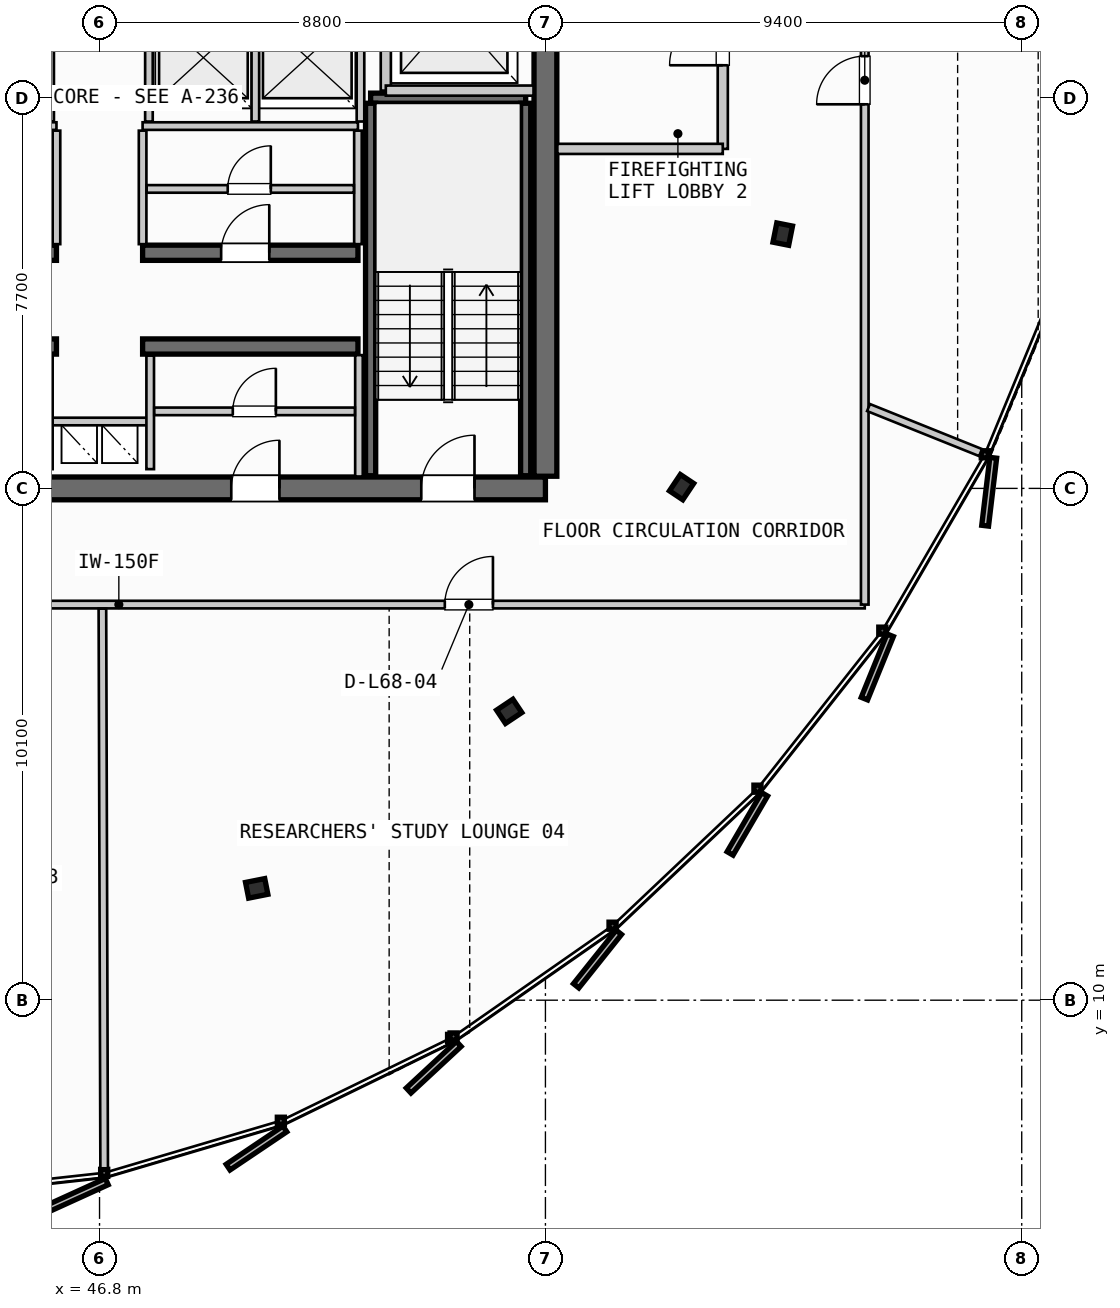
"""IFC4 building model, lengths in metres.
Left out: names, types, materials, properties, quantities, classifications, styles, units other than length and angle.
Written with IfcOpenShell. Run it as: python <this file> out.ifc"""

import sys

from ifc_helpers import new_model, si_unit, direction, frame, frame_2d, origin, origin_2d, place, context, subcontext, project, spatial, rectangle, i_section, extrude, source, transform, mapped, element, fill, save


model = new_model("IFC4")
c1 = context("Model", 3, precision=1e-05, world=origin(), true_north=direction((0.0, 1.0)))
c2 = subcontext(c1, "Body", "Model", "MODEL_VIEW")
j1 = project(units=[si_unit("LENGTHUNIT", "METRE"), si_unit("PLANEANGLEUNIT", "RADIAN")], contexts=[c1])
p1 = place(None, origin())
s1 = spatial("IfcSite", under=j1, at=p1, CompositionType="ELEMENT")
p2 = place(p1, origin())
s2 = spatial("IfcBuilding", under=s1, at=p2, CompositionType="ELEMENT")
p3 = place(p2, frame((0.0, 0.0, 259.45)))
s3 = spatial("IfcBuildingStorey", under=s2, at=p3, CompositionType="ELEMENT", Elevation=259.45)
p4 = place(p3, frame((38.0, 20.1, 0.0), z_axis=(0.0, 0.0, 1.0), x_axis=(1.0, 0.0, 0.0)))
e1 = element("IfcWall", 1, at=p4, inside=s3, PredefinedType="SHEAR", context=c2, shape_type="SweptSolid", body=[
    extrude(rectangle(XDim=17.6, YDim=0.45, at=frame_2d((8.8, 0.0))), origin(), (0.0, 0.0, 1.0), 3.21),
])
p5 = place(p4, frame((1.4, 0.0, 0.0)))
e2 = element("IfcOpeningElement", 2, at=p5, cuts=e1, PredefinedType="OPENING", context=c2, shape_type="SweptSolid", body=[
    extrude(rectangle(XDim=1.05, YDim=2.15, at=frame_2d((0.525, 1.075))), frame((0.0, 0.235, 0.0), z_axis=(0.0, -1.0, 0.0), x_axis=(1.0, 0.0, 0.0)), (0.0, 0.0, 1.0), 0.47),
])
p6 = place(p4, frame((15.15, 0.0, 0.0)))
e3 = element("IfcOpeningElement", 3, at=p6, cuts=e1, PredefinedType="OPENING", context=c2, shape_type="SweptSolid", body=[
    extrude(rectangle(XDim=1.05, YDim=2.15, at=frame_2d((0.525, 1.075))), frame((0.0, 0.235, 0.0), z_axis=(0.0, -1.0, 0.0), x_axis=(1.0, 0.0, 0.0)), (0.0, 0.0, 1.0), 0.47),
])
p7 = place(p4, frame((5.25, 0.0, 0.0)))
e4 = element("IfcOpeningElement", 4, at=p7, cuts=e1, PredefinedType="OPENING", context=c2, shape_type="SweptSolid", body=[
    extrude(rectangle(XDim=0.9, YDim=2.15, at=frame_2d((0.45, 1.075))), frame((0.0, 0.235, 0.0), z_axis=(0.0, -1.0, 0.0), x_axis=(1.0, 0.0, 0.0)), (0.0, 0.0, 1.0), 0.47),
])
p8 = place(p4, frame((11.4, 0.0, 0.0)))
e5 = element("IfcOpeningElement", 5, at=p8, cuts=e1, PredefinedType="OPENING", context=c2, shape_type="SweptSolid", body=[
    extrude(rectangle(XDim=0.95, YDim=2.15, at=frame_2d((0.475, 1.075))), frame((0.0, 0.235, 0.0), z_axis=(0.0, -1.0, 0.0), x_axis=(1.0, 0.0, 0.0)), (0.0, 0.0, 1.0), 0.47),
])
p9 = place(p3, frame((55.6, 20.34, 0.0), z_axis=(0.0, 0.0, 1.0), x_axis=(0.0, 1.0, 0.0)))
e6 = element("IfcWall", 6, at=p9, inside=s3, PredefinedType="SHEAR", context=c2, shape_type="SweptSolid", body=[
    extrude(rectangle(XDim=14.92, YDim=0.45, at=frame_2d((7.46, 0.0))), origin(), (0.0, 0.0, 1.0), 3.21),
])
p10 = place(p9, frame((12.71, 0.0, 0.0)))
e7 = element("IfcOpeningElement", 7, at=p10, cuts=e6, PredefinedType="OPENING", context=c2, shape_type="SweptSolid", body=[
    extrude(rectangle(XDim=1.05, YDim=2.15, at=frame_2d((0.525, 1.075))), frame((0.0, 0.235, 0.0), z_axis=(0.0, -1.0, 0.0), x_axis=(1.0, 0.0, 0.0)), (0.0, 0.0, 1.0), 0.47),
])
p11 = place(p9, frame((8.61, 0.0, 0.0)))
e8 = element("IfcOpeningElement", 8, at=p11, cuts=e6, PredefinedType="OPENING", context=c2, shape_type="SweptSolid", body=[
    extrude(rectangle(XDim=1.1, YDim=2.2, at=frame_2d((0.55, 1.1))), frame((0.0, 0.235, 0.0), z_axis=(0.0, -1.0, 0.0), x_axis=(1.0, 0.0, 0.0)), (0.0, 0.0, 1.0), 0.47),
])
for number, where, z_axis, x_axis in (
    (9, (41.7, 22.9, 0.0), (0.0, 0.0, 1.0), (1.0, 0.0, 0.0)),
    (10, (47.65, 22.9, 0.0), (0.0, 0.0, 1.0), (1.0, 0.0, 0.0)),
):
    element("IfcWall", number, at=place(p3, frame(where, z_axis=z_axis, x_axis=x_axis)), inside=s3, PredefinedType="SHEAR", context=c2, shape_type="SweptSolid", body=[
        extrude(rectangle(XDim=4.25, YDim=0.3, at=frame_2d((2.125, 0.0))), origin(), (0.0, 0.0, 1.0), 3.21),
    ])
p12 = place(p3, frame((41.7, 24.75, 0.0), z_axis=(0.0, 0.0, 1.0), x_axis=(1.0, 0.0, 0.0)))
e11 = element("IfcWall", 11, at=p12, inside=s3, PredefinedType="SHEAR", context=c2, shape_type="SweptSolid", body=[
    extrude(rectangle(XDim=4.25, YDim=0.3, at=frame_2d((2.125, 0.0))), origin(), (0.0, 0.0, 1.0), 3.21),
])
p13 = place(p12, frame((1.55, 0.0, 0.0)))
e12 = element("IfcOpeningElement", 12, at=p13, cuts=e11, PredefinedType="OPENING", context=c2, shape_type="SweptSolid", body=[
    extrude(rectangle(XDim=0.95, YDim=2.15, at=frame_2d((0.475, 1.075))), frame((0.0, 0.16, 0.0), z_axis=(0.0, -1.0, 0.0), x_axis=(1.0, 0.0, 0.0)), (0.0, 0.0, 1.0), 0.32),
])
p14 = place(p3, frame((47.65, 24.75, 0.0), z_axis=(0.0, 0.0, 1.0), x_axis=(1.0, 0.0, 0.0)))
e13 = element("IfcWall", 13, at=p14, inside=s3, PredefinedType="SHEAR", context=c2, shape_type="SweptSolid", body=[
    extrude(rectangle(XDim=4.25, YDim=0.3, at=frame_2d((2.125, 0.0))), origin(), (0.0, 0.0, 1.0), 3.21),
])
p15 = place(p14, frame((1.55, 0.0, 0.0)))
e14 = element("IfcOpeningElement", 14, at=p15, cuts=e13, PredefinedType="OPENING", context=c2, shape_type="SweptSolid", body=[
    extrude(rectangle(XDim=0.95, YDim=2.15, at=frame_2d((0.475, 1.075))), frame((0.0, 0.16, 0.0), z_axis=(0.0, -1.0, 0.0), x_axis=(1.0, 0.0, 0.0)), (0.0, 0.0, 1.0), 0.32),
])
m1 = source(origin(), c2, "Body", "SweptSolid", [
    extrude(i_section(OverallWidth=0.387, OverallDepth=0.316, WebThickness=0.019, FlangeThickness=0.028, FilletRadius=0.015, at=origin_2d()), origin(), (0.0, 0.0, 1.0), 3.21),
])
for number, where, z_axis, x_axis in (
    (15, (49.902, 12.207, 0.0), (0.0, 0.0, 1.0), (0.195, -0.981, 0.0)),
    (16, (54.885, 15.7, 0.0), (0.0, 0.0, 1.0), (0.556, -0.831, 0.0)),
    (17, (58.287, 20.125, 0.0), (0.0, 0.0, 1.0), (0.831, -0.556, 0.0)),
    (18, (60.284, 25.118, 0.0), (0.0, 0.0, 1.0), (0.981, -0.195, 0.0)),
):
    element("IfcColumn", number, at=place(p3, frame(where, z_axis=z_axis, x_axis=x_axis)), inside=s3, PredefinedType="COLUMN", context=c2, shape_type="MappedRepresentation", body=[
        mapped(m1, transform((0.0, 0.0, 0.0), scale=1.0)),
    ])
p16 = place(p3, frame((52.15, 27.8, 0.0), z_axis=(0.0, 0.0, 1.0), x_axis=(1.0, 0.0, 0.0)))
e19 = element("IfcWall", 19, at=p16, inside=s3, PredefinedType="SHEAR", context=c2, shape_type="SweptSolid", body=[
    extrude(rectangle(XDim=3.06, YDim=0.2, at=frame_2d((1.53, 0.0))), origin(), (0.0, 0.0, 1.0), 3.21),
])
for number, where, z_axis, x_axis in (
    (20, (55.21, 27.7, 0.0), (0.0, 0.0, 1.0), (0.0, -1.0, 0.0)),
    (21, (52.15, 20.35, 0.0), (0.0, 0.0, 1.0), (0.0, 1.0, 0.0)),
):
    element("IfcWall", number, at=place(p3, frame(where, z_axis=z_axis, x_axis=x_axis)), inside=s3, PredefinedType="SHEAR", context=c2, shape_type="SweptSolid", body=[
        extrude(rectangle(XDim=7.35, YDim=0.2, at=frame_2d((3.675, 0.0))), origin(), (0.0, 0.0, 1.0), 3.21),
    ])
p17 = place(p3, frame((45.8, 21.42, 0.0), z_axis=(0.0, 0.0, 1.0), x_axis=(1.0, 0.0, 0.0)))
e22 = element("IfcWall", 22, at=p17, inside=s3, PredefinedType="PARTITIONING", context=c2, shape_type="SweptSolid", body=[
    extrude(rectangle(XDim=2.0, YDim=0.15, at=frame_2d((1.0, 0.0))), origin(), (0.0, 0.0, 1.0), 2.735),
])
for number, where, z_axis, x_axis in (
    (23, (45.8, 20.48, 0.0), (0.0, 0.0, 1.0), (0.0, 1.0, 0.0)),
    (24, (47.8, 20.48, 0.0), (0.0, 0.0, 1.0), (0.0, 1.0, 0.0)),
):
    element("IfcWall", number, at=place(p3, frame(where, z_axis=z_axis, x_axis=x_axis)), inside=s3, PredefinedType="PARTITIONING", context=c2, shape_type="SweptSolid", body=[
        extrude(rectangle(XDim=2.24, YDim=0.15, at=frame_2d((1.12, 0.0))), origin(), (0.0, 0.0, 1.0), 2.735),
    ])
p18 = place(p3, frame((52.45, 27.95, 0.0), z_axis=(0.0, 0.0, 1.0), x_axis=(0.0, 1.0, 0.0)))
e25 = element("IfcWall", 25, at=p18, inside=s3, PredefinedType="PARTITIONING", context=c2, shape_type="SweptSolid", body=[
    extrude(rectangle(XDim=3.1, YDim=0.2, at=frame_2d((1.55, 0.0))), origin(), (0.0, 0.0, 1.0), 2.735),
])
p19 = place(p3, frame((52.45, 27.95, 0.0), z_axis=(0.0, 0.0, 1.0), x_axis=(1.0, 0.0, 0.0)))
e26 = element("IfcWall", 26, at=p19, inside=s3, PredefinedType="PARTITIONING", context=c2, shape_type="SweptSolid", body=[
    extrude(rectangle(XDim=2.915, YDim=0.2, at=frame_2d((1.458, 0.0))), origin(), (0.0, 0.0, 1.0), 2.735),
])
p20 = place(p3, frame((59.1, 26.8, 0.0), z_axis=(0.0, 0.0, 1.0), x_axis=(0.0, 1.0, 0.0)))
e27 = element("IfcWall", 27, at=p20, inside=s3, PredefinedType="PARTITIONING", context=c2, shape_type="SweptSolid", body=[
    extrude(rectangle(XDim=4.4, YDim=0.2, at=frame_2d((2.2, 0.0))), origin(), (0.0, 0.0, 1.0), 2.735),
])
p21 = place(p20, frame((1.65, 0.0, 0.0)))
e28 = element("IfcOpeningElement", 28, at=p21, cuts=e27, PredefinedType="OPENING", context=c2, shape_type="SweptSolid", body=[
    extrude(rectangle(XDim=1.05, YDim=2.15, at=frame_2d((0.525, 1.075))), frame((0.0, 0.11, 0.0), z_axis=(0.0, -1.0, 0.0), x_axis=(1.0, 0.0, 0.0)), (0.0, 0.0, 1.0), 0.22),
])
p22 = place(p3, frame((55.835, 26.8, 0.0), z_axis=(0.0, 0.0, 1.0), x_axis=(1.0, 0.0, 0.0)))
e29 = element("IfcWall", 29, at=p22, inside=s3, PredefinedType="PARTITIONING", context=c2, shape_type="SweptSolid", body=[
    extrude(rectangle(XDim=3.265, YDim=0.2, at=frame_2d((1.633, 0.0))), origin(), (0.0, 0.0, 1.0), 2.735),
])
p23 = place(p3, frame((51.92, 20.335, 0.0), z_axis=(0.0, 0.0, 1.0), x_axis=(0.0, 1.0, 0.0)))
e30 = element("IfcWall", 30, at=p23, inside=s3, PredefinedType="PARTITIONING", context=c2, shape_type="SweptSolid", body=[
    extrude(rectangle(XDim=2.395, YDim=0.15, at=frame_2d((1.198, 0.0))), origin(), (0.0, 0.0, 1.0), 2.735),
])
p24 = place(p3, frame((47.88, 21.62, 0.0), z_axis=(0.0, 0.0, 1.0), x_axis=(1.0, 0.0, 0.0)))
e31 = element("IfcWall", 31, at=p24, inside=s3, PredefinedType="PARTITIONING", context=c2, shape_type="SweptSolid", body=[
    extrude(rectangle(XDim=3.96, YDim=0.15, at=frame_2d((1.98, 0.0))), origin(), (0.0, 0.0, 1.0), 2.735),
])
p25 = place(p24, frame((1.55, 0.0, 0.0)))
e32 = element("IfcOpeningElement", 32, at=p25, cuts=e31, PredefinedType="OPENING", context=c2, shape_type="SweptSolid", body=[
    extrude(rectangle(XDim=0.85, YDim=2.15, at=frame_2d((0.425, 1.075))), frame((0.0, 0.085, 0.0), z_axis=(0.0, -1.0, 0.0), x_axis=(1.0, 0.0, 0.0)), (0.0, 0.0, 1.0), 0.17),
])
for number, where, z_axis, x_axis in (
    (33, (41.7, 27.25, 0.0), (0.0, 0.0, 1.0), (1.0, 0.0, 0.0)),
    (34, (47.65, 27.25, 0.0), (0.0, 0.0, 1.0), (1.0, 0.0, 0.0)),
):
    element("IfcWall", number, at=place(p3, frame(where, z_axis=z_axis, x_axis=x_axis)), inside=s3, PredefinedType="PARTITIONING", context=c2, shape_type="SweptSolid", body=[
        extrude(rectangle(XDim=4.25, YDim=0.15, at=frame_2d((2.125, 0.0))), origin(), (0.0, 0.0, 1.0), 2.735),
    ])
for number, where, z_axis, x_axis in (
    (35, (45.95, 24.92, 0.0), (0.0, 0.0, 1.0), (0.0, 1.0, 0.0)),
    (36, (47.65, 24.92, 0.0), (0.0, 0.0, 1.0), (0.0, 1.0, 0.0)),
    (37, (51.9, 24.92, 0.0), (0.0, 0.0, 1.0), (0.0, 1.0, 0.0)),
):
    element("IfcWall", number, at=place(p3, frame(where, z_axis=z_axis, x_axis=x_axis)), inside=s3, PredefinedType="PARTITIONING", context=c2, shape_type="SweptSolid", body=[
        extrude(rectangle(XDim=2.24, YDim=0.15, at=frame_2d((1.12, 0.0))), origin(), (0.0, 0.0, 1.0), 2.735),
    ])
p26 = place(p3, frame((47.73, 26.01, 0.0), z_axis=(0.0, 0.0, 1.0), x_axis=(1.0, 0.0, 0.0)))
e38 = element("IfcWall", 38, at=p26, inside=s3, PredefinedType="PARTITIONING", context=c2, shape_type="SweptSolid", body=[
    extrude(rectangle(XDim=4.09, YDim=0.15, at=frame_2d((2.045, 0.0))), origin(), (0.0, 0.0, 1.0), 2.735),
])
p27 = place(p26, frame((1.6, 0.0, 0.0)))
e39 = element("IfcOpeningElement", 39, at=p27, cuts=e38, PredefinedType="OPENING", context=c2, shape_type="SweptSolid", body=[
    extrude(rectangle(XDim=0.85, YDim=2.15, at=frame_2d((0.425, 1.075))), frame((0.0, 0.085, 0.0), z_axis=(0.0, -1.0, 0.0), x_axis=(1.0, 0.0, 0.0)), (0.0, 0.0, 1.0), 0.17),
])
for number, where, z_axis, x_axis in (
    (40, (45.825, 27.34, 0.0), (0.0, 0.0, 1.0), (0.0, 1.0, 0.0)),
    (41, (47.775, 27.34, 0.0), (0.0, 0.0, 1.0), (0.0, 1.0, 0.0)),
    (42, (49.875, 27.34, 0.0), (0.0, 0.0, 1.0), (0.0, 1.0, 0.0)),
    (43, (51.95, 27.34, 0.0), (0.0, 0.0, 1.0), (0.0, 1.0, 0.0)),
):
    element("IfcWall", number, at=place(p3, frame(where, z_axis=z_axis, x_axis=x_axis)), inside=s3, PredefinedType="PARTITIONING", context=c2, shape_type="SweptSolid", body=[
        extrude(rectangle(XDim=2.34, YDim=0.15, at=frame_2d((1.17, 0.0))), origin(), (0.0, 0.0, 1.0), 2.735),
    ])
p28 = place(p3, frame((32.46, 17.807, 0.0), z_axis=(0.0, 0.0, 1.0), x_axis=(1.0, 0.0, 0.0)))
e44 = element("IfcWall", 44, at=p28, inside=s3, PredefinedType="PARTITIONING", context=c2, shape_type="SweptSolid", body=[
    extrude(rectangle(XDim=29.442, YDim=0.15, at=frame_2d((14.721, 0.0))), origin(), (0.0, 0.0, 1.0), 2.735),
])
p29 = place(p28, frame((5.22, 0.0, 0.0)))
e45 = element("IfcOpeningElement", 45, at=p29, cuts=e44, PredefinedType="OPENING", context=c2, shape_type="SweptSolid", body=[
    extrude(rectangle(XDim=0.95, YDim=2.15, at=frame_2d((0.475, 1.075))), frame((0.0, 0.085, 0.0), z_axis=(0.0, -1.0, 0.0), x_axis=(1.0, 0.0, 0.0)), (0.0, 0.0, 1.0), 0.17),
])
p30 = place(p28, frame((11.443, 0.0, 0.0)))
e46 = element("IfcOpeningElement", 46, at=p30, cuts=e44, PredefinedType="OPENING", context=c2, shape_type="SweptSolid", body=[
    extrude(rectangle(XDim=0.95, YDim=2.15, at=frame_2d((0.475, 1.075))), frame((0.0, 0.085, 0.0), z_axis=(0.0, -1.0, 0.0), x_axis=(1.0, 0.0, 0.0)), (0.0, 0.0, 1.0), 0.17),
])
p31 = place(p28, frame((21.154, 0.0, 0.0)))
e47 = element("IfcOpeningElement", 47, at=p31, cuts=e44, PredefinedType="OPENING", context=c2, shape_type="SweptSolid", body=[
    extrude(rectangle(XDim=0.95, YDim=2.15, at=frame_2d((0.475, 1.075))), frame((0.0, 0.085, 0.0), z_axis=(0.0, -1.0, 0.0), x_axis=(1.0, 0.0, 0.0)), (0.0, 0.0, 1.0), 0.17),
])
p32 = place(p3, frame((61.902, 17.807, 0.0), z_axis=(0.0, 0.0, 1.0), x_axis=(0.0, 1.0, 0.0)))
e48 = element("IfcWall", 48, at=p32, inside=s3, PredefinedType="PARTITIONING", context=c2, shape_type="SweptSolid", body=[
    extrude(rectangle(XDim=19.524, YDim=0.15, at=frame_2d((9.762, 0.0))), origin(), (0.0, 0.0, 1.0), 2.735),
])
p33 = place(p32, frame((9.873, 0.0, 0.0)))
e49 = element("IfcOpeningElement", 49, at=p33, cuts=e48, PredefinedType="OPENING", context=c2, shape_type="SweptSolid", body=[
    extrude(rectangle(XDim=0.95, YDim=2.15, at=frame_2d((0.475, 1.075))), frame((0.0, 0.085, 0.0), z_axis=(0.0, -1.0, 0.0), x_axis=(1.0, 0.0, 0.0)), (0.0, 0.0, 1.0), 0.17),
])
p34 = place(p3, frame((46.857, 17.727, 0.0), z_axis=(0.0, 0.0, 1.0), x_axis=(0.00316097362, -0.99999500411, 0.0)))
e50 = element("IfcWall", 50, at=p34, inside=s3, PredefinedType="PARTITIONING", context=c2, shape_type="SweptSolid", body=[
    extrude(rectangle(XDim=11.045, YDim=0.15, at=frame_2d((5.522, 0.0))), origin(), (0.0, 0.0, 1.0), 2.735),
])
p35 = place(p3, frame((61.976, 21.695, 0.0), z_axis=(0.0, 0.0, 1.0), x_axis=(0.927896312923, -0.37283834629, 0.0)))
e51 = element("IfcWall", 51, at=p35, inside=s3, PredefinedType="PARTITIONING", context=c2, shape_type="SweptSolid", body=[
    extrude(rectangle(XDim=2.384, YDim=0.15, at=frame_2d((1.192, 0.0))), origin(), (0.0, 0.0, 1.0), 2.735),
])
m2 = source(origin(), c2, "Body", "SweptSolid", [
    extrude(rectangle(XDim=1.05, YDim=2.15, at=frame_2d((0.525, 1.075))), frame((0.0, 0.025, 0.0), z_axis=(0.0, -1.0, 0.0), x_axis=(1.0, 0.0, 0.0)), (0.0, 0.0, 1.0), 0.05),
])
p36 = place(p6, origin())
e52 = element("IfcDoor", 52, at=p36, inside=s3, OperationType="SINGLE_SWING_RIGHT", PredefinedType="DOOR", context=c2, shape_type="MappedRepresentation", body=[
    mapped(m2, transform((0.0, 0.0, 0.0), scale=1.0)),
])
fill(e3, e52)
m3 = source(origin(), c2, "Body", "SweptSolid", [
    extrude(rectangle(XDim=0.95, YDim=2.15, at=frame_2d((0.475, 1.075))), frame((0.0, 0.025, 0.0), z_axis=(0.0, -1.0, 0.0), x_axis=(1.0, 0.0, 0.0)), (0.0, 0.0, 1.0), 0.05),
])
p37 = place(p8, origin())
e53 = element("IfcDoor", 53, at=p37, inside=s3, OperationType="SINGLE_SWING_RIGHT", PredefinedType="DOOR", context=c2, shape_type="MappedRepresentation", body=[
    mapped(m3, transform((0.0, 0.0, 0.0), scale=1.0)),
])
fill(e5, e53)
p38 = place(p15, origin())
e54 = element("IfcDoor", 54, at=p38, inside=s3, OperationType="SINGLE_SWING_RIGHT", PredefinedType="DOOR", context=c2, shape_type="MappedRepresentation", body=[
    mapped(m3, transform((0.0, 0.0, 0.0), scale=1.0)),
])
fill(e14, e54)
p39 = place(p21, origin())
e55 = element("IfcDoor", 55, at=p39, inside=s3, OperationType="SINGLE_SWING_LEFT", PredefinedType="DOOR", context=c2, shape_type="MappedRepresentation", body=[
    mapped(m2, transform((0.0, 0.0, 0.0), scale=1.0)),
])
fill(e28, e55)
m4 = source(origin(), c2, "Body", "SweptSolid", [
    extrude(rectangle(XDim=0.85, YDim=2.15, at=frame_2d((0.425, 1.075))), frame((0.0, 0.025, 0.0), z_axis=(0.0, -1.0, 0.0), x_axis=(1.0, 0.0, 0.0)), (0.0, 0.0, 1.0), 0.05),
])
p40 = place(p25, origin())
e56 = element("IfcDoor", 56, at=p40, inside=s3, OperationType="SINGLE_SWING_RIGHT", PredefinedType="DOOR", context=c2, shape_type="MappedRepresentation", body=[
    mapped(m4, transform((0.0, 0.0, 0.0), scale=1.0)),
])
fill(e32, e56)
p41 = place(p27, origin())
e57 = element("IfcDoor", 57, at=p41, inside=s3, OperationType="SINGLE_SWING_RIGHT", PredefinedType="DOOR", context=c2, shape_type="MappedRepresentation", body=[
    mapped(m4, transform((0.0, 0.0, 0.0), scale=1.0)),
])
fill(e39, e57)
p42 = place(p31, origin())
e58 = element("IfcDoor", 58, at=p42, inside=s3, OperationType="SINGLE_SWING_RIGHT", PredefinedType="DOOR", context=c2, shape_type="MappedRepresentation", body=[
    mapped(m3, transform((0.0, 0.0, 0.0), scale=1.0)),
])
fill(e47, e58)
p43 = place(p33, origin())
e59 = element("IfcDoor", 59, at=p43, inside=s3, OperationType="SINGLE_SWING_LEFT", PredefinedType="DOOR", context=c2, shape_type="MappedRepresentation", body=[
    mapped(m3, transform((0.0, 0.0, 0.0), scale=1.0)),
])
fill(e49, e59)
save(model, sys.argv[1])
